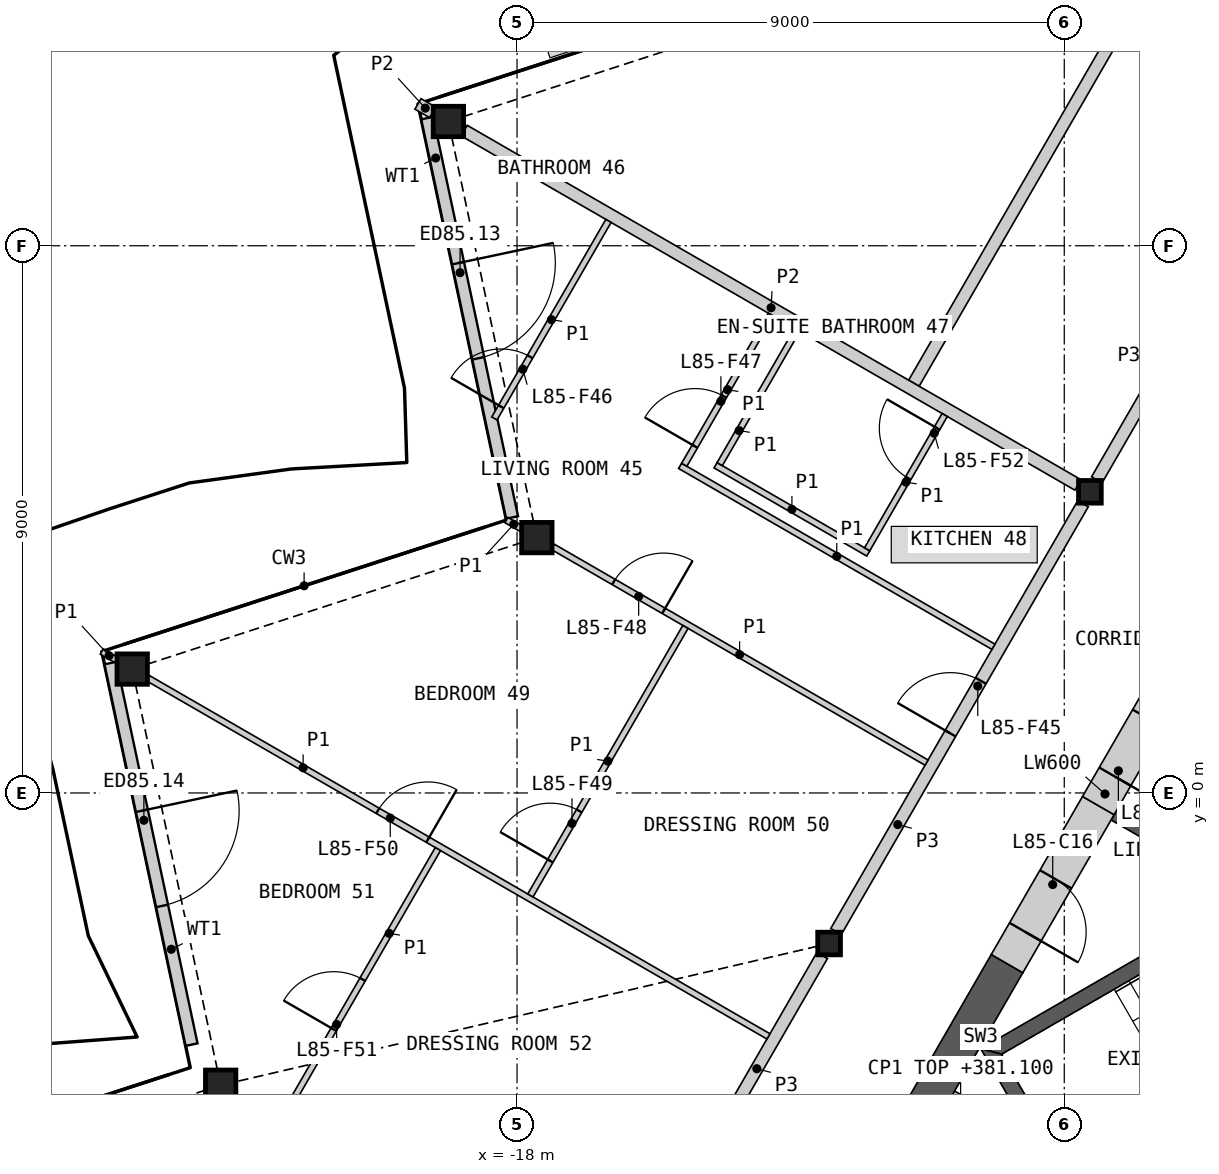
"""IFC4 building model, lengths in metres.
Left out: names, types, materials, properties, quantities, classifications, styles, units other than length and angle.
Written with IfcOpenShell. Run it as: python <this file> out.ifc"""

import sys

from ifc_helpers import new_model, si_unit, direction, frame, frame_2d, origin, origin_2d, place, context, subcontext, project, spatial, polyline, rectangle, hollow_rectangle, i_section, outline, extrude, element, fill, save


model = new_model("IFC4")
c1 = context("Model", 3, precision=1e-05, world=origin(), true_north=direction((0.0, 1.0)))
c2 = subcontext(c1, "Body", "Model", "MODEL_VIEW")
j1 = project(units=[si_unit("LENGTHUNIT", "METRE"), si_unit("PLANEANGLEUNIT", "RADIAN")], contexts=[c1])
p1 = place(None, origin())
s1 = spatial("IfcSite", under=j1, at=p1, CompositionType="ELEMENT")
p2 = place(p1, origin())
s2 = spatial("IfcBuilding", under=s1, at=p2, CompositionType="ELEMENT")
p3 = place(p2, frame((0.0, 0.0, 378.0)))
s3 = spatial("IfcBuildingStorey", under=s2, at=p3, CompositionType="ELEMENT", Elevation=378.0)
for number, where, z_axis, x_axis in (
    (1, (-19.129, 11.044, 0.0), (0.0, 0.0, 1.0), (1.0, 0.0, 0.0)),
    (2, (-17.674, 4.199, 0.0), (0.0, 0.0, 1.0), (1.0, 0.0, 0.0)),
    (3, (-24.329, 2.037, 0.0), (0.0, 0.0, 1.0), (1.0, 0.0, 0.0)),
    (4, (-22.874, -4.807, 0.0), (0.0, 0.0, 1.0), (1.0, 0.0, 0.0)),
):
    element("IfcColumn", number, at=place(p3, frame(where, z_axis=z_axis, x_axis=x_axis)), inside=s3, PredefinedType="COLUMN", context=c2, shape_type="SweptSolid", body=[
        extrude(hollow_rectangle(XDim=0.5, YDim=0.5, WallThickness=0.03, at=origin_2d()), origin(), (0.0, 0.0, 1.0), 3.4),
    ])
for number, where, z_axis, x_axis in (
    (5, (-8.578, 4.953, 0.0), (0.0, 0.0, 1.0), (1.0, 0.0, 0.0)),
    (6, (-12.868, -2.476, 0.0), (0.0, 0.0, 1.0), (1.0, 0.0, 0.0)),
):
    element("IfcColumn", number, at=place(p3, frame(where, z_axis=z_axis, x_axis=x_axis)), inside=s3, PredefinedType="COLUMN", context=c2, shape_type="SweptSolid", body=[
        extrude(i_section(OverallWidth=0.374, OverallDepth=0.372, WebThickness=0.016, FlangeThickness=0.026, at=origin_2d()), origin(), (0.0, 0.0, 1.0), 3.4),
    ])
p4 = place(p3, frame((-19.477, 11.1, 0.0), z_axis=(0.0, 0.0, 1.0), x_axis=(0.207910061304, -0.978147947096, 0.0)))
e7 = element("IfcWall", 7, at=p4, inside=s3, PredefinedType="SOLIDWALL", context=c2, shape_type="SweptSolid", body=[
    extrude(rectangle(XDim=6.716, YDim=0.2, at=frame_2d((3.358, 0.0))), origin(), (0.0, 0.0, 1.0), 2.634),
])
p5 = place(p4, frame((2.439, 0.0, 0.0)))
e8 = element("IfcOpeningElement", 8, at=p5, cuts=e7, PredefinedType="OPENING", context=c2, shape_type="SweptSolid", body=[
    extrude(rectangle(XDim=1.6, YDim=2.25, at=frame_2d((0.8, 1.125))), frame((0.0, 0.11, 0.0), z_axis=(0.0, -1.0, 0.0), x_axis=(1.0, 0.0, 0.0)), (0.0, 0.0, 1.0), 0.22),
])
p6 = place(p3, frame((-24.687, 2.137, 0.0), z_axis=(0.0, 0.0, 1.0), x_axis=(0.207904718109, -0.978149082803, 0.0)))
e9 = element("IfcWall", 9, at=p6, inside=s3, PredefinedType="SOLIDWALL", context=c2, shape_type="SweptSolid", body=[
    extrude(rectangle(XDim=6.416, YDim=0.2, at=frame_2d((3.208, 0.0))), origin(), (0.0, 0.0, 1.0), 2.634),
])
p7 = place(p6, frame((2.484, 0.0, 0.0)))
e10 = element("IfcOpeningElement", 10, at=p7, cuts=e9, PredefinedType="OPENING", context=c2, shape_type="SweptSolid", body=[
    extrude(rectangle(XDim=1.6, YDim=2.25, at=frame_2d((0.8, 1.125))), frame((0.0, 0.11, 0.0), z_axis=(0.0, -1.0, 0.0), x_axis=(1.0, 0.0, 0.0)), (0.0, 0.0, 1.0), 0.22),
])
p8 = place(p3, origin())
e11 = element("IfcWall", 11, at=p8, inside=s3, PredefinedType="SHEAR", context=c2, shape_type="SweptSolid", body=[
    extrude(outline(polyline([(-6.061, -1.697), (-8.231, -0.444), (-8.131, -0.271), (-5.96, -1.524), (-6.061, -1.697)])), origin(), (0.0, 0.0, 1.0), 3.1),
])
p9 = place(p3, origin())
e12 = element("IfcWall", 12, at=p9, inside=s3, PredefinedType="SHEAR", context=c2, shape_type="SweptSolid", body=[
    extrude(outline(polyline([(-5.307, -1.281), (-10.374, -4.206), (-10.032, -4.298), (-5.182, -1.498), (-5.307, -1.281)])), origin(), (0.0, 0.0, 1.0), 3.1),
])
p10 = place(p3, origin())
e13 = element("IfcWall", 13, at=p10, inside=s3, PredefinedType="SHEAR", context=c2, shape_type="SweptSolid", body=[
    extrude(outline(polyline([(-10.374, -4.206), (-8.83, -6.881), (-8.738, -6.539), (-10.032, -4.298), (-10.374, -4.206)])), origin(), (0.0, 0.0, 1.0), 3.1),
])
p11 = place(p3, origin())
e14 = element("IfcWall", 14, at=p11, inside=s3, PredefinedType="SHEAR", context=c2, shape_type="SweptSolid", body=[
    extrude(outline(polyline([(-8.738, -6.539), (-8.83, -6.881), (-3.763, -3.956), (-3.888, -3.739), (-8.738, -6.539)])), origin(), (0.0, 0.0, 1.0), 3.1),
])
p12 = place(p3, frame((-10.842, -4.967, 0.0), z_axis=(0.0, 0.0, 1.0), x_axis=(0.866098216386, -0.499873863663, 0.0)))
e15 = element("IfcWall", 15, at=p12, inside=s3, PredefinedType="PARTITIONING", context=c2, shape_type="SweptSolid", body=[
    extrude(rectangle(XDim=1.582, YDim=0.15, at=frame_2d((0.791, 0.0))), origin(), (0.0, 0.0, 1.0), 3.1),
])
p13 = place(p3, frame((-9.941, -2.807, 0.0), z_axis=(0.0, 0.0, 1.0), x_axis=(-0.500020646047, -0.866013483456, 0.0)))
e16 = element("IfcWall", 16, at=p13, inside=s3, PredefinedType="SHEAR", context=c2, shape_type="SweptSolid", body=[
    extrude(rectangle(XDim=4.559, YDim=0.6, at=frame_2d((2.28, 0.0))), origin(), (0.0, 0.0, 1.0), 3.1),
])
p14 = place(p3, frame((-8.44, -0.208, 0.0), z_axis=(0.0, 0.0, 1.0), x_axis=(-0.499997052475, -0.866027105532, 0.0)))
e17 = element("IfcWall", 17, at=p14, inside=s3, PredefinedType="SHEAR", context=c2, shape_type="SweptSolid", body=[
    extrude(rectangle(XDim=3.001, YDim=0.6, at=frame_2d((1.501, 0.0))), origin(), (0.0, 0.0, 1.0), 3.1),
])
p15 = place(p14, frame((1.4, 0.0, 0.0)))
e18 = element("IfcOpeningElement", 18, at=p15, cuts=e17, PredefinedType="OPENING", context=c2, shape_type="SweptSolid", body=[
    extrude(rectangle(XDim=1.0, YDim=2.1, at=frame_2d((0.5, 1.05))), frame((0.0, 0.31, 0.0), z_axis=(0.0, -1.0, 0.0), x_axis=(1.0, 0.0, 0.0)), (0.0, 0.0, 1.0), 0.62),
])
p16 = place(p3, frame((-7.34, 1.698, 0.0), z_axis=(0.0, 0.0, 1.0), x_axis=(-0.50002983664, -0.866008176907, 0.0)))
e19 = element("IfcWall", 19, at=p16, inside=s3, PredefinedType="SHEAR", context=c2, shape_type="SweptSolid", body=[
    extrude(rectangle(XDim=2.2, YDim=0.6, at=frame_2d((1.1, 0.0))), origin(), (0.0, 0.0, 1.0), 3.1),
])
p17 = place(p16, frame((0.55, 0.0, 0.0)))
e20 = element("IfcOpeningElement", 20, at=p17, cuts=e19, PredefinedType="OPENING", context=c2, shape_type="SweptSolid", body=[
    extrude(rectangle(XDim=1.1, YDim=2.1, at=frame_2d((0.55, 1.05))), frame((0.0, 0.31, 0.0), z_axis=(0.0, -1.0, 0.0), x_axis=(1.0, 0.0, 0.0)), (0.0, 0.0, 1.0), 0.62),
])
p18 = place(p3, frame((-8.465, 5.15, 0.0), z_axis=(0.0, 0.0, 1.0), x_axis=(0.499992155518, 0.866029932751, 0.0)))
e21 = element("IfcWall", 21, at=p18, inside=s3, PredefinedType="PARTITIONING", context=c2, shape_type="SweptSolid", body=[
    extrude(rectangle(XDim=8.123, YDim=0.2, at=frame_2d((4.062, 0.0))), origin(), (0.0, 0.0, 1.0), 3.1),
])
p19 = place(p18, frame((3.587, 0.0, 0.0)))
e22 = element("IfcOpeningElement", 22, at=p19, cuts=e21, PredefinedType="OPENING", context=c2, shape_type="SweptSolid", body=[
    extrude(rectangle(XDim=0.95, YDim=2.1, at=frame_2d((0.475, 1.05))), frame((0.0, 0.11, 0.0), z_axis=(0.0, -1.0, 0.0), x_axis=(1.0, 0.0, 0.0)), (0.0, 0.0, 1.0), 0.22),
])
p20 = place(p3, frame((-12.754, -2.279, 0.0), z_axis=(0.0, 0.0, 1.0), x_axis=(0.500001682468, 0.866024432409, 0.0)))
e23 = element("IfcWall", 23, at=p20, inside=s3, PredefinedType="PARTITIONING", context=c2, shape_type="SweptSolid", body=[
    extrude(rectangle(XDim=8.124, YDim=0.2, at=frame_2d((4.062, 0.0))), origin(), (0.0, 0.0, 1.0), 3.1),
])
p21 = place(p20, frame((3.762, 0.0, 0.0)))
e24 = element("IfcOpeningElement", 24, at=p21, cuts=e23, PredefinedType="OPENING", context=c2, shape_type="SweptSolid", body=[
    extrude(rectangle(XDim=1.0, YDim=2.1, at=frame_2d((0.5, 1.05))), frame((0.0, 0.11, 0.0), z_axis=(0.0, -1.0, 0.0), x_axis=(1.0, 0.0, 0.0)), (0.0, 0.0, 1.0), 0.22),
])
p22 = place(p3, frame((-15.131, -6.397, 0.0), z_axis=(0.0, 0.0, 1.0), x_axis=(0.499986217557, 0.866033360935, 0.0)))
e25 = element("IfcWall", 25, at=p22, inside=s3, PredefinedType="PARTITIONING", context=c2, shape_type="SweptSolid", body=[
    extrude(rectangle(XDim=4.3, YDim=0.2, at=frame_2d((2.15, 0.0))), origin(), (0.0, 0.0, 1.0), 3.1),
])
p23 = place(p3, frame((-11.473, 6.74, 0.0), z_axis=(0.0, 0.0, 1.0), x_axis=(0.500001082559, 0.866024778768, 0.0)))
e26 = element("IfcWall", 26, at=p23, inside=s3, PredefinedType="PARTITIONING", context=c2, shape_type="SweptSolid", body=[
    extrude(rectangle(XDim=15.094, YDim=0.2, at=frame_2d((7.547, 0.0))), origin(), (0.0, 0.0, 1.0), 2.33),
])
p24 = place(p23, frame((10.383, 0.0, 0.0)))
e27 = element("IfcOpeningElement", 27, at=p24, cuts=e26, PredefinedType="OPENING", context=c2, shape_type="SweptSolid", body=[
    extrude(rectangle(XDim=0.95, YDim=2.1, at=frame_2d((0.475, 1.05))), frame((0.0, 0.11, 0.0), z_axis=(0.0, -1.0, 0.0), x_axis=(1.0, 0.0, 0.0)), (0.0, 0.0, 1.0), 0.22),
])
p25 = place(p3, frame((-18.869, 10.894, 0.0), z_axis=(0.0, 0.0, 1.0), x_axis=(0.866023724155, -0.500002909193, 0.0)))
e28 = element("IfcWall", 28, at=p25, inside=s3, PredefinedType="PARTITIONING", context=c2, shape_type="SweptSolid", body=[
    extrude(rectangle(XDim=11.655, YDim=0.2, at=frame_2d((5.827, 0.0))), origin(), (0.0, 0.0, 1.0), 2.33),
])
p26 = place(p3, frame((-19.629, 11.333, 0.0), z_axis=(0.0, 0.0, 1.0), x_axis=(0.866068339032, -0.499925626596, 0.0)))
e29 = element("IfcWall", 29, at=p26, inside=s3, PredefinedType="PARTITIONING", context=c2, shape_type="SweptSolid", body=[
    extrude(rectangle(XDim=0.277, YDim=0.2, at=frame_2d((0.139, 0.0))), origin(), (0.0, 0.0, 1.0), 2.33),
])
p27 = place(p3, frame((-24.069, 1.887, 0.0), z_axis=(0.0, 0.0, 1.0), x_axis=(0.866023404247, -0.500003463284, 0.0)))
e30 = element("IfcWall", 30, at=p27, inside=s3, PredefinedType="PARTITIONING", context=c2, shape_type="SweptSolid", body=[
    extrude(rectangle(XDim=11.782, YDim=0.1, at=frame_2d((5.891, 0.0))), origin(), (0.0, 0.0, 1.0), 2.33),
])
p28 = place(p27, frame((4.363, 0.0, 0.0)))
e31 = element("IfcOpeningElement", 31, at=p28, cuts=e30, PredefinedType="OPENING", context=c2, shape_type="SweptSolid", body=[
    extrude(rectangle(XDim=0.95, YDim=2.1, at=frame_2d((0.475, 1.05))), frame((0.0, 0.06, 0.0), z_axis=(0.0, -1.0, 0.0), x_axis=(1.0, 0.0, 0.0)), (0.0, 0.0, 1.0), 0.12),
])
p29 = place(p3, frame((-17.414, 4.049, 0.0), z_axis=(0.0, 0.0, 1.0), x_axis=(0.866033839264, -0.499985389037, 0.0)))
e32 = element("IfcWall", 32, at=p29, inside=s3, PredefinedType="PARTITIONING", context=c2, shape_type="SweptSolid", body=[
    extrude(rectangle(XDim=7.1, YDim=0.1, at=frame_2d((3.55, 0.0))), origin(), (0.0, 0.0, 1.0), 2.33),
])
p30 = place(p29, frame((1.158, 0.0, 0.0)))
e33 = element("IfcOpeningElement", 33, at=p30, cuts=e32, PredefinedType="OPENING", context=c2, shape_type="SweptSolid", body=[
    extrude(rectangle(XDim=0.95, YDim=2.1, at=frame_2d((0.475, 1.05))), frame((0.0, 0.06, 0.0), z_axis=(0.0, -1.0, 0.0), x_axis=(1.0, 0.0, 0.0)), (0.0, 0.0, 1.0), 0.12),
])
p31 = place(p3, frame((-22.505, -6.472, 0.0), z_axis=(0.0, 0.0, 1.0), x_axis=(0.499999516514, 0.866025682925, 0.0)))
e34 = element("IfcWall", 34, at=p31, inside=s3, PredefinedType="PARTITIONING", context=c2, shape_type="SweptSolid", body=[
    extrude(rectangle(XDim=6.407, YDim=0.1, at=frame_2d((3.204, 0.0))), origin(), (0.0, 0.0, 1.0), 2.33),
])
p32 = place(p31, frame((2.981, 0.0, 0.0)))
e35 = element("IfcOpeningElement", 35, at=p32, cuts=e34, PredefinedType="OPENING", context=c2, shape_type="SweptSolid", body=[
    extrude(rectangle(XDim=0.95, YDim=2.1, at=frame_2d((0.475, 1.05))), frame((0.0, 0.06, 0.0), z_axis=(0.0, -1.0, 0.0), x_axis=(1.0, 0.0, 0.0)), (0.0, 0.0, 1.0), 0.12),
])
p33 = place(p3, frame((-15.318, 5.38, 0.0), z_axis=(0.0, 0.0, 1.0), x_axis=(0.866035260786, -0.499982926783, 0.0)))
e36 = element("IfcWall", 36, at=p33, inside=s3, PredefinedType="PARTITIONING", context=c2, shape_type="SweptSolid", body=[
    extrude(rectangle(XDim=5.95, YDim=0.1, at=frame_2d((2.975, 0.0))), origin(), (0.0, 0.0, 1.0), 2.33),
])
p34 = place(p3, frame((-17.78, -1.686, 0.0), z_axis=(0.0, 0.0, 1.0), x_axis=(0.500005610874, 0.86602216432, 0.0)))
e37 = element("IfcWall", 37, at=p34, inside=s3, PredefinedType="PARTITIONING", context=c2, shape_type="SweptSolid", body=[
    extrude(rectangle(XDim=5.1, YDim=0.1, at=frame_2d((2.55, 0.0))), origin(), (0.0, 0.0, 1.0), 2.33),
])
p35 = place(p34, frame((0.656, 0.0, 0.0)))
e38 = element("IfcOpeningElement", 38, at=p35, cuts=e37, PredefinedType="OPENING", context=c2, shape_type="SweptSolid", body=[
    extrude(rectangle(XDim=0.95, YDim=2.1, at=frame_2d((0.475, 1.05))), frame((0.0, 0.06, 0.0), z_axis=(0.0, -1.0, 0.0), x_axis=(1.0, 0.0, 0.0)), (0.0, 0.0, 1.0), 0.12),
])
p36 = place(p3, frame((-18.372, 6.16, 0.0), z_axis=(0.0, 0.0, 1.0), x_axis=(0.499981580887, 0.866036037803, 0.0)))
e39 = element("IfcWall", 39, at=p36, inside=s3, PredefinedType="PARTITIONING", context=c2, shape_type="SweptSolid", body=[
    extrude(rectangle(XDim=3.752, YDim=0.1, at=frame_2d((1.876, 0.0))), origin(), (0.0, 0.0, 1.0), 2.33),
])
p37 = place(p36, frame((0.222, 0.0, 0.0)))
e40 = element("IfcOpeningElement", 40, at=p37, cuts=e39, PredefinedType="OPENING", context=c2, shape_type="SweptSolid", body=[
    extrude(rectangle(XDim=0.95, YDim=2.1, at=frame_2d((0.475, 1.05))), frame((0.0, 0.06, 0.0), z_axis=(0.0, -1.0, 0.0), x_axis=(1.0, 0.0, 0.0)), (0.0, 0.0, 1.0), 0.12),
])
p38 = place(p3, frame((-15.25, 5.398, 0.0), z_axis=(0.0, 0.0, 1.0), x_axis=(0.499935029643, 0.866062911188, 0.0)))
e41 = element("IfcWall", 41, at=p38, inside=s3, PredefinedType="PARTITIONING", context=c2, shape_type="SweptSolid", body=[
    extrude(rectangle(XDim=2.85, YDim=0.1, at=frame_2d((1.425, 0.0))), origin(), (0.0, 0.0, 1.0), 2.33),
])
p39 = place(p38, frame((0.35, 0.0, 0.0)))
e42 = element("IfcOpeningElement", 42, at=p39, cuts=e41, PredefinedType="OPENING", context=c2, shape_type="SweptSolid", body=[
    extrude(rectangle(XDim=0.95, YDim=2.1, at=frame_2d((0.475, 1.05))), frame((0.0, 0.06, 0.0), z_axis=(0.0, -1.0, 0.0), x_axis=(1.0, 0.0, 0.0)), (0.0, 0.0, 1.0), 0.12),
])
p40 = place(p3, frame((-14.735, 5.389, 0.0), z_axis=(0.0, 0.0, 1.0), x_axis=(0.866032775405, -0.499987231761, 0.0)))
e43 = element("IfcWall", 43, at=p40, inside=s3, PredefinedType="PARTITIONING", context=c2, shape_type="SweptSolid", body=[
    extrude(rectangle(XDim=2.9, YDim=0.1, at=frame_2d((1.45, 0.0))), origin(), (0.0, 0.0, 1.0), 2.33),
])
p41 = place(p3, frame((-12.242, 4.008, 0.0), z_axis=(0.0, 0.0, 1.0), x_axis=(0.499948979701, 0.866054858364, 0.0)))
e44 = element("IfcWall", 44, at=p41, inside=s3, PredefinedType="PARTITIONING", context=c2, shape_type="SweptSolid", body=[
    extrude(rectangle(XDim=2.55, YDim=0.1, at=frame_2d((1.275, 0.0))), origin(), (0.0, 0.0, 1.0), 2.33),
])
p42 = place(p41, frame((1.35, 0.0, 0.0)))
e45 = element("IfcOpeningElement", 45, at=p42, cuts=e44, PredefinedType="OPENING", context=c2, shape_type="SweptSolid", body=[
    extrude(rectangle(XDim=0.95, YDim=2.1, at=frame_2d((0.475, 1.05))), frame((0.0, 0.06, 0.0), z_axis=(0.0, -1.0, 0.0), x_axis=(1.0, 0.0, 0.0)), (0.0, 0.0, 1.0), 0.12),
])
p43 = place(p3, frame((-14.667, 5.408, 0.0), z_axis=(0.0, 0.0, 1.0), x_axis=(0.499948979701, 0.866054858364, 0.0)))
e46 = element("IfcWall", 46, at=p43, inside=s3, PredefinedType="PARTITIONING", context=c2, shape_type="SweptSolid", body=[
    extrude(rectangle(XDim=2.55, YDim=0.1, at=frame_2d((1.275, 0.0))), origin(), (0.0, 0.0, 1.0), 2.33),
])
for number, where, z_axis, x_axis in (
    (47, (-18.174, 4.488, 0.0), (0.0, 0.0, 1.0), (0.866, -0.5, 0.0)),
    (48, (-24.829, 2.326, 0.0), (0.0, 0.0, 1.0), (0.866, -0.5, 0.0)),
):
    element("IfcWall", number, at=place(p3, frame(where, z_axis=z_axis, x_axis=x_axis)), inside=s3, PredefinedType="PARTITIONING", context=c2, shape_type="SweptSolid", body=[
        extrude(rectangle(XDim=0.278, YDim=0.1, at=frame_2d((0.139, 0.0))), origin(), (0.0, 0.0, 1.0), 2.33),
    ])
p44 = place(p5, origin())
e49 = element("IfcDoor", 49, at=p44, inside=s3, OperationType="DOUBLE_DOOR_SINGLE_SWING", PredefinedType="DOOR", context=c2, shape_type="SweptSolid", body=[
    extrude(rectangle(XDim=1.6, YDim=2.25, at=frame_2d((0.8, 1.125))), frame((0.0, 0.025, 0.0), z_axis=(0.0, -1.0, 0.0), x_axis=(1.0, 0.0, 0.0)), (0.0, 0.0, 1.0), 0.05),
])
fill(e8, e49)
p45 = place(p7, origin())
e50 = element("IfcDoor", 50, at=p45, inside=s3, OperationType="DOUBLE_DOOR_SINGLE_SWING", PredefinedType="DOOR", context=c2, shape_type="SweptSolid", body=[
    extrude(rectangle(XDim=1.6, YDim=2.25, at=frame_2d((0.8, 1.125))), frame((0.0, 0.025, 0.0), z_axis=(0.0, -1.0, 0.0), x_axis=(1.0, 0.0, 0.0)), (0.0, 0.0, 1.0), 0.05),
])
fill(e10, e50)
p46 = place(p15, origin())
e51 = element("IfcDoor", 51, at=p46, inside=s3, OperationType="SINGLE_SWING_RIGHT", PredefinedType="DOOR", context=c2, shape_type="SweptSolid", body=[
    extrude(rectangle(XDim=1.0, YDim=2.1, at=frame_2d((0.5, 1.05))), frame((0.0, 0.055, 0.0), z_axis=(0.0, -1.0, 0.0), x_axis=(1.0, 0.0, 0.0)), (0.0, 0.0, 1.0), 0.05),
])
fill(e18, e51)
p47 = place(p17, origin())
e52 = element("IfcDoor", 52, at=p47, inside=s3, OperationType="SINGLE_SWING_RIGHT", PredefinedType="DOOR", context=c2, shape_type="SweptSolid", body=[
    extrude(rectangle(XDim=1.1, YDim=2.1, at=frame_2d((0.55, 1.05))), frame((0.0, 0.055, 0.0), z_axis=(0.0, -1.0, 0.0), x_axis=(1.0, 0.0, 0.0)), (0.0, 0.0, 1.0), 0.05),
])
fill(e20, e52)
p48 = place(p21, origin())
e53 = element("IfcDoor", 53, at=p48, inside=s3, OperationType="SINGLE_SWING_LEFT", PredefinedType="DOOR", context=c2, shape_type="SweptSolid", body=[
    extrude(rectangle(XDim=1.0, YDim=2.1, at=frame_2d((0.5, 1.05))), frame((0.0, 0.025, 0.0), z_axis=(0.0, -1.0, 0.0), x_axis=(1.0, 0.0, 0.0)), (0.0, 0.0, 1.0), 0.05),
])
fill(e24, e53)
p49 = place(p37, origin())
e54 = element("IfcDoor", 54, at=p49, inside=s3, OperationType="SINGLE_SWING_LEFT", PredefinedType="DOOR", context=c2, shape_type="SweptSolid", body=[
    extrude(rectangle(XDim=0.95, YDim=2.1, at=frame_2d((0.475, 1.05))), frame((0.0, 0.025, 0.0), z_axis=(0.0, -1.0, 0.0), x_axis=(1.0, 0.0, 0.0)), (0.0, 0.0, 1.0), 0.05),
])
fill(e40, e54)
p50 = place(p39, origin())
e55 = element("IfcDoor", 55, at=p50, inside=s3, OperationType="SINGLE_SWING_LEFT", PredefinedType="DOOR", context=c2, shape_type="SweptSolid", body=[
    extrude(rectangle(XDim=0.95, YDim=2.1, at=frame_2d((0.475, 1.05))), frame((0.0, 0.025, 0.0), z_axis=(0.0, -1.0, 0.0), x_axis=(1.0, 0.0, 0.0)), (0.0, 0.0, 1.0), 0.05),
])
fill(e42, e55)
p51 = place(p30, origin())
e56 = element("IfcDoor", 56, at=p51, inside=s3, OperationType="SINGLE_SWING_RIGHT", PredefinedType="DOOR", context=c2, shape_type="SweptSolid", body=[
    extrude(rectangle(XDim=0.95, YDim=2.1, at=frame_2d((0.475, 1.05))), frame((0.0, 0.025, 0.0), z_axis=(0.0, -1.0, 0.0), x_axis=(1.0, 0.0, 0.0)), (0.0, 0.0, 1.0), 0.05),
])
fill(e33, e56)
p52 = place(p35, origin())
e57 = element("IfcDoor", 57, at=p52, inside=s3, OperationType="SINGLE_SWING_LEFT", PredefinedType="DOOR", context=c2, shape_type="SweptSolid", body=[
    extrude(rectangle(XDim=0.95, YDim=2.1, at=frame_2d((0.475, 1.05))), frame((0.0, 0.025, 0.0), z_axis=(0.0, -1.0, 0.0), x_axis=(1.0, 0.0, 0.0)), (0.0, 0.0, 1.0), 0.05),
])
fill(e38, e57)
p53 = place(p28, origin())
e58 = element("IfcDoor", 58, at=p53, inside=s3, OperationType="SINGLE_SWING_RIGHT", PredefinedType="DOOR", context=c2, shape_type="SweptSolid", body=[
    extrude(rectangle(XDim=0.95, YDim=2.1, at=frame_2d((0.475, 1.05))), frame((0.0, 0.025, 0.0), z_axis=(0.0, -1.0, 0.0), x_axis=(1.0, 0.0, 0.0)), (0.0, 0.0, 1.0), 0.05),
])
fill(e31, e58)
p54 = place(p32, origin())
e59 = element("IfcDoor", 59, at=p54, inside=s3, OperationType="SINGLE_SWING_LEFT", PredefinedType="DOOR", context=c2, shape_type="SweptSolid", body=[
    extrude(rectangle(XDim=0.95, YDim=2.1, at=frame_2d((0.475, 1.05))), frame((0.0, 0.025, 0.0), z_axis=(0.0, -1.0, 0.0), x_axis=(1.0, 0.0, 0.0)), (0.0, 0.0, 1.0), 0.05),
])
fill(e35, e59)
p55 = place(p42, origin())
e60 = element("IfcDoor", 60, at=p55, inside=s3, OperationType="SINGLE_SWING_RIGHT", PredefinedType="DOOR", context=c2, shape_type="SweptSolid", body=[
    extrude(rectangle(XDim=0.95, YDim=2.1, at=frame_2d((0.475, 1.05))), frame((0.0, 0.025, 0.0), z_axis=(0.0, -1.0, 0.0), x_axis=(1.0, 0.0, 0.0)), (0.0, 0.0, 1.0), 0.05),
])
fill(e45, e60)
save(model, sys.argv[1])
